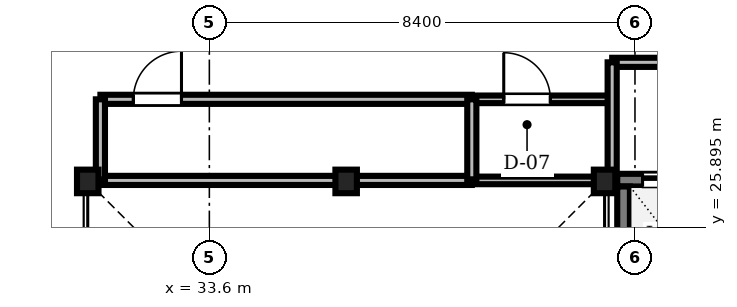
"""IFC4 building model, lengths in metres.
Left out: names, types, materials, properties, quantities, classifications, styles, units other than length and angle.
Written with IfcOpenShell. Run it as: python <this file> out.ifc"""

import sys

from ifc_helpers import new_model, si_unit, direction, frame, frame_2d, origin, origin_2d, place, context, subcontext, project, spatial, rectangle, i_section, extrude, source, transform, mapped, element, fill, save


model = new_model("IFC4")
c1 = context("Model", 3, precision=1e-05, world=origin(), true_north=direction((0.0, 1.0)))
c2 = subcontext(c1, "Body", "Model", "MODEL_VIEW")
j1 = project(units=[si_unit("LENGTHUNIT", "METRE"), si_unit("PLANEANGLEUNIT", "RADIAN")], contexts=[c1])
p1 = place(None, origin())
s1 = spatial("IfcSite", under=j1, at=p1, CompositionType="ELEMENT")
p2 = place(p1, origin())
s2 = spatial("IfcBuilding", under=s1, at=p2, CompositionType="ELEMENT")
p3 = place(p2, frame((0.0, 0.0, 152.0)))
s3 = spatial("IfcBuildingStorey", under=s2, at=p3, CompositionType="ELEMENT", Elevation=152.0)
m1 = source(origin(), c2, "Body", "SweptSolid", [
    extrude(i_section(OverallWidth=0.424, OverallDepth=0.465, WebThickness=0.035, FlangeThickness=0.056, FilletRadius=0.015, at=origin_2d()), origin(), (0.0, 0.0, 1.0), 3.46),
])
for number, where, z_axis, x_axis in (
    (1, (41.4, 26.8, 0.0), (0.0, 0.0, 1.0), (1.0, 0.0, 0.0)),
    (2, (36.3, 26.8, 0.0), (0.0, 0.0, 1.0), (1.0, 0.0, 0.0)),
    (3, (31.2, 26.8, 0.0), (0.0, 0.0, 1.0), (1.0, 0.0, 0.0)),
):
    element("IfcColumn", number, at=place(p3, frame(where, z_axis=z_axis, x_axis=x_axis)), inside=s3, PredefinedType="COLUMN", context=c2, shape_type="MappedRepresentation", body=[
        mapped(m1, transform((0.0, 0.0, 0.0), scale=1.0)),
    ])
m2 = source(origin(), c2, "Body", "SweptSolid", [
    extrude(rectangle(XDim=2.3, YDim=0.25, at=frame_2d((1.15, 0.0))), origin(), (0.0, 0.0, 1.0), 3.46),
])
p4 = place(p3, frame((41.65, 26.825, 0.0), z_axis=(0.0, 0.0, 1.0), x_axis=(1.0, 0.0, 0.0)))
e4 = element("IfcWall", 4, at=p4, inside=s3, PredefinedType="SOLIDWALL", context=c2, shape_type="MappedRepresentation", body=[
    mapped(m2, transform((0.0, 0.0, 0.0), scale=1.0)),
])
m3 = source(origin(), c2, "Body", "SweptSolid", [
    extrude(rectangle(XDim=1.3, YDim=2.3, at=frame_2d((0.65, 1.15))), frame((0.0, 0.135, 0.0), z_axis=(0.0, -1.0, 0.0), x_axis=(1.0, 0.0, 0.0)), (0.0, 0.0, 1.0), 0.27),
])
p5 = place(p4, frame((0.5, 0.0, 0.0)))
e5 = element("IfcOpeningElement", 5, at=p5, cuts=e4, PredefinedType="OPENING", context=c2, shape_type="MappedRepresentation", body=[
    mapped(m3, transform((0.0, 0.0, 0.0), scale=1.0)),
])
p6 = place(p3, frame((41.775, 24.4, 0.0), z_axis=(0.0, 0.0, 1.0), x_axis=(0.0, 1.0, 0.0)))
e6 = element("IfcWall", 6, at=p6, inside=s3, PredefinedType="SOLIDWALL", context=c2, shape_type="MappedRepresentation", body=[
    mapped(m2, transform((0.0, 0.0, 0.0), scale=1.0)),
])
m4 = source(origin(), c2, "Body", "SweptSolid", [
    extrude(rectangle(XDim=7.33, YDim=0.18, at=frame_2d((3.665, 0.0))), origin(), (0.0, 0.0, 1.0), 3.092),
])
p7 = place(p3, frame((31.45, 28.42, 0.0), z_axis=(0.0, 0.0, 1.0), x_axis=(1.0, 0.0, 0.0)))
e7 = element("IfcWall", 7, at=p7, inside=s3, PredefinedType="PARTITIONING", context=c2, shape_type="MappedRepresentation", body=[
    mapped(m4, transform((0.0, 0.0, 0.0), scale=1.0)),
])
m5 = source(origin(), c2, "Body", "SweptSolid", [
    extrude(rectangle(XDim=0.95, YDim=2.15, at=frame_2d((0.475, 1.075))), frame((0.0, 0.1, 0.0), z_axis=(0.0, -1.0, 0.0), x_axis=(1.0, 0.0, 0.0)), (0.0, 0.0, 1.0), 0.2),
])
p8 = place(p7, frame((0.65, 0.0, 0.0)))
e8 = element("IfcOpeningElement", 8, at=p8, cuts=e7, PredefinedType="OPENING", context=c2, shape_type="MappedRepresentation", body=[
    mapped(m5, transform((0.0, 0.0, 0.0), scale=1.0)),
])
m6 = source(origin(), c2, "Body", "SweptSolid", [
    extrude(rectangle(XDim=4.548, YDim=0.18, at=frame_2d((2.274, 0.0))), origin(), (0.0, 0.0, 1.0), 3.092),
])
p9 = place(p3, frame((41.55, 29.15, 0.0), z_axis=(0.0, 0.0, 1.0), x_axis=(1.0, 0.0, 0.0)))
e9 = element("IfcWall", 9, at=p9, inside=s3, PredefinedType="PARTITIONING", context=c2, shape_type="MappedRepresentation", body=[
    mapped(m6, transform((0.0, 0.0, 0.0), scale=1.0)),
])
m7 = source(origin(), c2, "Body", "SweptSolid", [
    extrude(rectangle(XDim=1.2, YDim=2.2, at=frame_2d((0.6, 1.1))), frame((0.0, 0.1, 0.0), z_axis=(0.0, -1.0, 0.0), x_axis=(1.0, 0.0, 0.0)), (0.0, 0.0, 1.0), 0.2),
])
p10 = place(p9, frame((1.6, 0.0, 0.0)))
e10 = element("IfcOpeningElement", 10, at=p10, cuts=e9, PredefinedType="OPENING", context=c2, shape_type="MappedRepresentation", body=[
    mapped(m7, transform((0.0, 0.0, 0.0), scale=1.0)),
])
m8 = source(origin(), c2, "Body", "SweptSolid", [
    extrude(rectangle(XDim=2.74, YDim=0.15, at=frame_2d((1.37, 0.0))), origin(), (0.0, 0.0, 1.0), 3.46),
])
p11 = place(p3, frame((38.78, 28.42, 0.0), z_axis=(0.0, 0.0, 1.0), x_axis=(1.0, 0.0, 0.0)))
e11 = element("IfcWall", 11, at=p11, inside=s3, PredefinedType="PARTITIONING", context=c2, shape_type="MappedRepresentation", body=[
    mapped(m8, transform((0.0, 0.0, 0.0), scale=1.0)),
])
m9 = source(origin(), c2, "Body", "SweptSolid", [
    extrude(rectangle(XDim=0.92, YDim=2.1, at=frame_2d((0.46, 1.05))), frame((0.0, 0.085, 0.0), z_axis=(0.0, -1.0, 0.0), x_axis=(1.0, 0.0, 0.0)), (0.0, 0.0, 1.0), 0.17),
])
p12 = place(p11, frame((0.63, 0.0, 0.0)))
e12 = element("IfcOpeningElement", 12, at=p12, cuts=e11, PredefinedType="OPENING", context=c2, shape_type="MappedRepresentation", body=[
    mapped(m9, transform((0.0, 0.0, 0.0), scale=1.0)),
])
m10 = source(origin(), c2, "Body", "SweptSolid", [
    extrude(rectangle(XDim=7.33, YDim=0.18, at=frame_2d((3.665, 0.0))), origin(), (0.0, 0.0, 1.0), 3.002),
])
p13 = place(p3, frame((31.45, 26.82, 0.0), z_axis=(0.0, 0.0, 1.0), x_axis=(1.0, 0.0, 0.0)))
e13 = element("IfcWall", 13, at=p13, inside=s3, PredefinedType="PARTITIONING", context=c2, shape_type="MappedRepresentation", body=[
    mapped(m10, transform((0.0, 0.0, 0.0), scale=1.0)),
])
m11 = source(origin(), c2, "Body", "SweptSolid", [
    extrude(rectangle(XDim=2.74, YDim=0.15, at=frame_2d((1.37, 0.0))), origin(), (0.0, 0.0, 1.0), 2.852),
])
p14 = place(p3, frame((38.78, 26.82, 0.0), z_axis=(0.0, 0.0, 1.0), x_axis=(1.0, 0.0, 0.0)))
e14 = element("IfcWall", 14, at=p14, inside=s3, PredefinedType="PARTITIONING", context=c2, shape_type="MappedRepresentation", body=[
    mapped(m11, transform((0.0, 0.0, 0.0), scale=1.0)),
])
m12 = source(origin(), c2, "Body", "SweptSolid", [
    extrude(rectangle(XDim=2.35, YDim=0.18, at=frame_2d((1.175, 0.0))), origin(), (0.0, 0.0, 1.0), 2.852),
])
p15 = place(p3, frame((41.55, 26.8, 0.0), z_axis=(0.0, 0.0, 1.0), x_axis=(0.0, 1.0, 0.0)))
e15 = element("IfcWall", 15, at=p15, inside=s3, PredefinedType="PARTITIONING", context=c2, shape_type="MappedRepresentation", body=[
    mapped(m12, transform((0.0, 0.0, 0.0), scale=1.0)),
])
m13 = source(origin(), c2, "Body", "SweptSolid", [
    extrude(rectangle(XDim=1.6, YDim=0.18, at=frame_2d((0.8, 0.0))), origin(), (0.0, 0.0, 1.0), 3.002),
])
for number, where, z_axis, x_axis in (
    (16, (31.45, 26.82, 0.0), (0.0, 0.0, 1.0), (0.0, 1.0, 0.0)),
    (17, (38.78, 26.82, 0.0), (0.0, 0.0, 1.0), (0.0, 1.0, 0.0)),
):
    element("IfcWall", number, at=place(p3, frame(where, z_axis=z_axis, x_axis=x_axis)), inside=s3, PredefinedType="PARTITIONING", context=c2, shape_type="MappedRepresentation", body=[
        mapped(m13, transform((0.0, 0.0, 0.0), scale=1.0)),
    ])
m14 = source(origin(), c2, "Body", "SweptSolid", [
    extrude(rectangle(XDim=1.3, YDim=2.3, at=frame_2d((0.65, 1.15))), frame((0.0, 0.025, 0.0), z_axis=(0.0, -1.0, 0.0), x_axis=(1.0, 0.0, 0.0)), (0.0, 0.0, 1.0), 0.05),
])
p16 = place(p5, origin())
e18 = element("IfcDoor", 18, at=p16, inside=s3, OperationType="DOUBLE_DOOR_SLIDING", PredefinedType="DOOR", context=c2, shape_type="MappedRepresentation", body=[
    mapped(m14, transform((0.0, 0.0, 0.0), scale=1.0)),
])
fill(e5, e18)
m15 = source(origin(), c2, "Body", "SweptSolid", [
    extrude(rectangle(XDim=0.95, YDim=2.15, at=frame_2d((0.475, 1.075))), frame((0.0, 0.025, 0.0), z_axis=(0.0, -1.0, 0.0), x_axis=(1.0, 0.0, 0.0)), (0.0, 0.0, 1.0), 0.05),
])
p17 = place(p8, origin())
e19 = element("IfcDoor", 19, at=p17, inside=s3, OperationType="SINGLE_SWING_RIGHT", PredefinedType="DOOR", context=c2, shape_type="MappedRepresentation", body=[
    mapped(m15, transform((0.0, 0.0, 0.0), scale=1.0)),
])
fill(e8, e19)
m16 = source(origin(), c2, "Body", "SweptSolid", [
    extrude(rectangle(XDim=0.92, YDim=2.1, at=frame_2d((0.46, 1.05))), frame((0.0, 0.025, 0.0), z_axis=(0.0, -1.0, 0.0), x_axis=(1.0, 0.0, 0.0)), (0.0, 0.0, 1.0), 0.05),
])
p18 = place(p12, origin())
e20 = element("IfcDoor", 20, at=p18, inside=s3, OperationType="SINGLE_SWING_LEFT", PredefinedType="DOOR", context=c2, shape_type="MappedRepresentation", body=[
    mapped(m16, transform((0.0, 0.0, 0.0), scale=1.0)),
])
fill(e12, e20)
save(model, sys.argv[1])
